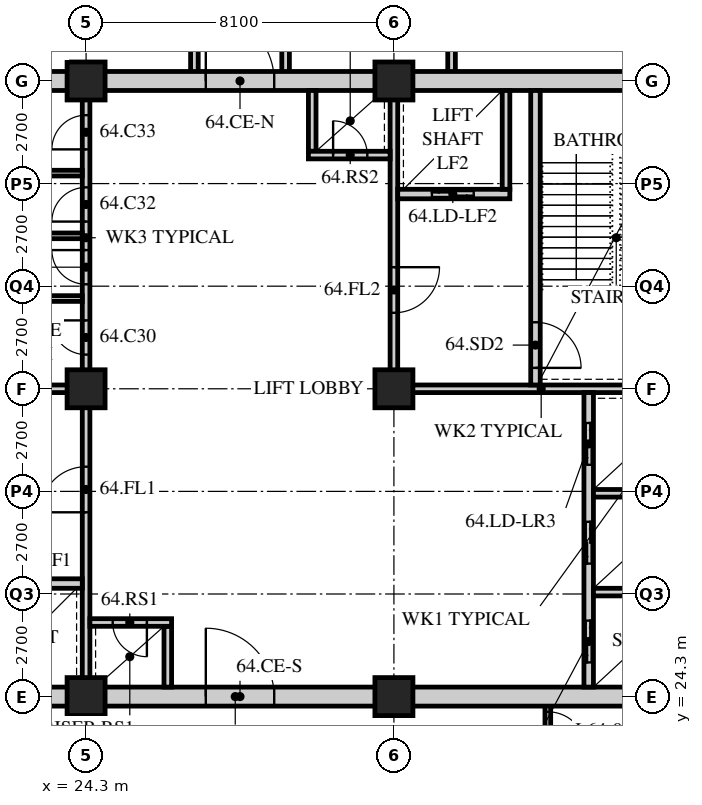
"""IFC4 building model, lengths in metres.
Left out: names, types, materials, properties, quantities, classifications, styles, units other than length and angle.
Written with IfcOpenShell. Run it as: python <this file> out.ifc"""

import sys

from ifc_helpers import new_model, si_unit, direction, frame, frame_2d, origin, origin_2d, place, context, subcontext, project, spatial, rectangle, hollow_rectangle, extrude, element, fill, save


model = new_model("IFC4")
c1 = context("Model", 3, precision=1e-05, world=origin(), true_north=direction((0.0, 1.0)))
c2 = subcontext(c1, "Body", "Model", "MODEL_VIEW")
j1 = project(units=[si_unit("LENGTHUNIT", "METRE"), si_unit("PLANEANGLEUNIT", "RADIAN")], contexts=[c1])
p1 = place(None, origin())
s1 = spatial("IfcSite", under=j1, at=p1, CompositionType="ELEMENT")
p2 = place(p1, origin())
s2 = spatial("IfcBuilding", under=s1, at=p2, CompositionType="ELEMENT")
p3 = place(p2, frame((0.0, 0.0, 250.2)))
s3 = spatial("IfcBuildingStorey", under=s2, at=p3, CompositionType="ELEMENT", Elevation=250.2)
for number, where, z_axis, x_axis in (
    (1, (24.3, 24.3, 0.0), (0.0, 0.0, 1.0), (1.0, 0.0, 0.0)),
    (2, (24.3, 32.4, 0.0), (0.0, 0.0, 1.0), (1.0, 0.0, 0.0)),
    (3, (24.3, 40.5, 0.0), (0.0, 0.0, 1.0), (1.0, 0.0, 0.0)),
    (4, (32.4, 24.3, 0.0), (0.0, 0.0, 1.0), (1.0, 0.0, 0.0)),
    (5, (32.4, 32.4, 0.0), (0.0, 0.0, 1.0), (1.0, 0.0, 0.0)),
    (6, (32.4, 40.5, 0.0), (0.0, 0.0, 1.0), (1.0, 0.0, 0.0)),
):
    element("IfcColumn", number, at=place(p3, frame(where, z_axis=z_axis, x_axis=x_axis)), inside=s3, PredefinedType="COLUMN", context=c2, shape_type="SweptSolid", body=[
        extrude(hollow_rectangle(XDim=1.0, YDim=1.0, WallThickness=0.1, at=origin_2d()), origin(), (0.0, 0.0, 1.0), 3.9),
    ])
for number, where, z_axis, x_axis in (
    (7, (33.917, 50.85, 0.0), (0.0, 0.0, 1.0), (0.0, -1.0, 0.0)),
    (8, (27.15, 40.5, 0.0), (0.0, 0.0, 1.0), (0.0, 1.0, 0.0)),
    (9, (29.55, 40.5, 0.0), (0.0, 0.0, 1.0), (0.0, 1.0, 0.0)),
):
    element("IfcWall", number, at=place(p3, frame(where, z_axis=z_axis, x_axis=x_axis)), inside=s3, PredefinedType="SOLIDWALL", context=c2, shape_type="SweptSolid", body=[
        extrude(rectangle(XDim=10.35, YDim=0.2, at=frame_2d((5.175, 0.0))), origin(), (0.0, 0.0, 1.0), 3.69),
    ])
p4 = place(p3, frame((36.45, 22.5, 0.0), z_axis=(0.0, 0.0, 1.0), x_axis=(0.0, 1.0, 0.0)))
e10 = element("IfcWall", 10, at=p4, inside=s3, PredefinedType="PARTITIONING", context=c2, shape_type="SweptSolid", body=[
    extrude(rectangle(XDim=1.8, YDim=0.15, at=frame_2d((0.9, 0.0))), origin(), (0.0, 0.0, 1.0), 3.69),
])
p5 = place(p4, frame((0.4, 0.0, 0.0)))
e11 = element("IfcOpeningElement", 11, at=p5, cuts=e10, PredefinedType="OPENING", context=c2, shape_type="SweptSolid", body=[
    extrude(rectangle(XDim=1.0, YDim=2.1, at=frame_2d((0.5, 1.05))), frame((0.0, 0.085, 0.0), z_axis=(0.0, -1.0, 0.0), x_axis=(1.0, 0.0, 0.0)), (0.0, 0.0, 1.0), 0.17),
])
p6 = place(p3, frame((15.95, 24.3, 0.0), z_axis=(0.0, 0.0, 1.0), x_axis=(1.0, 0.0, 0.0)))
e12 = element("IfcWall", 12, at=p6, inside=s3, PredefinedType="SOLIDWALL", context=c2, shape_type="SweptSolid", body=[
    extrude(rectangle(XDim=24.55, YDim=0.5, at=frame_2d((12.275, 0.0))), origin(), (0.0, 0.0, 1.0), 3.04),
])
p7 = place(p6, frame((11.5, 0.0, 0.0)))
e13 = element("IfcOpeningElement", 13, at=p7, cuts=e12, PredefinedType="OPENING", context=c2, shape_type="SweptSolid", body=[
    extrude(rectangle(XDim=1.8, YDim=2.4, at=frame_2d((0.9, 1.2))), frame((0.0, 0.26, 0.0), z_axis=(0.0, -1.0, 0.0), x_axis=(1.0, 0.0, 0.0)), (0.0, 0.0, 1.0), 0.52),
])
p8 = place(p3, frame((15.95, 40.5, 0.0), z_axis=(0.0, 0.0, 1.0), x_axis=(1.0, 0.0, 0.0)))
e14 = element("IfcWall", 14, at=p8, inside=s3, PredefinedType="SOLIDWALL", context=c2, shape_type="SweptSolid", body=[
    extrude(rectangle(XDim=24.55, YDim=0.5, at=frame_2d((12.275, 0.0))), origin(), (0.0, 0.0, 1.0), 3.04),
])
p9 = place(p8, frame((11.5, 0.0, 0.0)))
e15 = element("IfcOpeningElement", 15, at=p9, cuts=e14, PredefinedType="OPENING", context=c2, shape_type="SweptSolid", body=[
    extrude(rectangle(XDim=1.8, YDim=2.4, at=frame_2d((0.9, 1.2))), frame((0.0, 0.26, 0.0), z_axis=(0.0, -1.0, 0.0), x_axis=(1.0, 0.0, 0.0)), (0.0, 0.0, 1.0), 0.52),
])
p10 = place(p3, frame((16.45, 32.4, 0.0), z_axis=(0.0, 0.0, 1.0), x_axis=(1.0, 0.0, 0.0)))
e16 = element("IfcWall", 16, at=p10, inside=s3, PredefinedType="SOLIDWALL", context=c2, shape_type="SweptSolid", body=[
    extrude(rectangle(XDim=7.95, YDim=0.2, at=frame_2d((3.975, 0.0))), origin(), (0.0, 0.0, 1.0), 3.078),
])
p11 = place(p3, frame((24.3, 24.55, 0.0), z_axis=(0.0, 0.0, 1.0), x_axis=(0.0, 1.0, 0.0)))
e17 = element("IfcWall", 17, at=p11, inside=s3, PredefinedType="SOLIDWALL", context=c2, shape_type="SweptSolid", body=[
    extrude(rectangle(XDim=7.75, YDim=0.2, at=frame_2d((3.875, 0.0))), origin(), (0.0, 0.0, 1.0), 3.078),
])
p12 = place(p11, frame((4.6, 0.0, 0.0)))
e18 = element("IfcOpeningElement", 18, at=p12, cuts=e17, PredefinedType="OPENING", context=c2, shape_type="SweptSolid", body=[
    extrude(rectangle(XDim=1.2, YDim=2.1, at=frame_2d((0.6, 1.05))), frame((0.0, 0.11, 0.0), z_axis=(0.0, -1.0, 0.0), x_axis=(1.0, 0.0, 0.0)), (0.0, 0.0, 1.0), 0.22),
])
p13 = place(p3, frame((21.25, 27.275, 0.0), z_axis=(0.0, 0.0, 1.0), x_axis=(1.0, 0.0, 0.0)))
e19 = element("IfcWall", 19, at=p13, inside=s3, PredefinedType="SOLIDWALL", context=c2, shape_type="SweptSolid", body=[
    extrude(rectangle(XDim=2.95, YDim=0.25, at=frame_2d((1.475, 0.0))), origin(), (0.0, 0.0, 1.0), 3.69),
])
p14 = place(p13, frame((0.95, 0.0, 0.0)))
e20 = element("IfcOpeningElement", 20, at=p14, cuts=e19, PredefinedType="OPENING", context=c2, shape_type="SweptSolid", body=[
    extrude(rectangle(XDim=1.1, YDim=2.4, at=frame_2d((0.55, 1.2))), frame((0.0, 0.135, 0.0), z_axis=(0.0, -1.0, 0.0), x_axis=(1.0, 0.0, 0.0)), (0.0, 0.0, 1.0), 0.27),
])
p15 = place(p3, frame((26.45, 24.55, 0.0), z_axis=(0.0, 0.0, 1.0), x_axis=(0.0, 1.0, 0.0)))
e21 = element("IfcWall", 21, at=p15, inside=s3, PredefinedType="SOLIDWALL", context=c2, shape_type="SweptSolid", body=[
    extrude(rectangle(XDim=1.6, YDim=0.2, at=frame_2d((0.8, 0.0))), origin(), (0.0, 0.0, 1.0), 3.69),
])
p16 = place(p3, frame((24.4, 26.25, 0.0), z_axis=(0.0, 0.0, 1.0), x_axis=(1.0, 0.0, 0.0)))
e22 = element("IfcWall", 22, at=p16, inside=s3, PredefinedType="SOLIDWALL", context=c2, shape_type="SweptSolid", body=[
    extrude(rectangle(XDim=2.15, YDim=0.2, at=frame_2d((1.075, 0.0))), origin(), (0.0, 0.0, 1.0), 3.69),
])
p17 = place(p16, frame((0.6, 0.0, 0.0)))
e23 = element("IfcOpeningElement", 23, at=p17, cuts=e22, PredefinedType="OPENING", context=c2, shape_type="SweptSolid", body=[
    extrude(rectangle(XDim=0.9, YDim=2.1, at=frame_2d((0.45, 1.05))), frame((0.0, 0.11, 0.0), z_axis=(0.0, -1.0, 0.0), x_axis=(1.0, 0.0, 0.0)), (0.0, 0.0, 1.0), 0.22),
])
p18 = place(p3, frame((32.3, 32.4, 0.0), z_axis=(0.0, 0.0, 1.0), x_axis=(1.0, 0.0, 0.0)))
e24 = element("IfcWall", 24, at=p18, inside=s3, PredefinedType="SOLIDWALL", context=c2, shape_type="SweptSolid", body=[
    extrude(rectangle(XDim=7.95, YDim=0.2, at=frame_2d((3.975, 0.0))), origin(), (0.0, 0.0, 1.0), 3.078),
])
p19 = place(p3, frame((32.4, 32.5, 0.0), z_axis=(0.0, 0.0, 1.0), x_axis=(0.0, 1.0, 0.0)))
e25 = element("IfcWall", 25, at=p19, inside=s3, PredefinedType="SOLIDWALL", context=c2, shape_type="SweptSolid", body=[
    extrude(rectangle(XDim=7.75, YDim=0.2, at=frame_2d((3.875, 0.0))), origin(), (0.0, 0.0, 1.0), 3.078),
])
p20 = place(p19, frame((1.9, 0.0, 0.0)))
e26 = element("IfcOpeningElement", 26, at=p20, cuts=e25, PredefinedType="OPENING", context=c2, shape_type="SweptSolid", body=[
    extrude(rectangle(XDim=1.2, YDim=2.1, at=frame_2d((0.6, 1.05))), frame((0.0, 0.11, 0.0), z_axis=(0.0, -1.0, 0.0), x_axis=(1.0, 0.0, 0.0)), (0.0, 0.0, 1.0), 0.22),
])
p21 = place(p3, frame((37.525, 24.55, 0.0), z_axis=(0.0, 0.0, 1.0), x_axis=(0.0, 1.0, 0.0)))
e27 = element("IfcWall", 27, at=p21, inside=s3, PredefinedType="SOLIDWALL", context=c2, shape_type="SweptSolid", body=[
    extrude(rectangle(XDim=7.75, YDim=0.25, at=frame_2d((3.875, 0.0))), origin(), (0.0, 0.0, 1.0), 3.69),
])
p22 = place(p21, frame((0.65, 0.0, 0.0)))
e28 = element("IfcOpeningElement", 28, at=p22, cuts=e27, PredefinedType="OPENING", context=c2, shape_type="SweptSolid", body=[
    extrude(rectangle(XDim=1.1, YDim=2.4, at=frame_2d((0.55, 1.2))), frame((0.0, 0.135, 0.0), z_axis=(0.0, -1.0, 0.0), x_axis=(1.0, 0.0, 0.0)), (0.0, 0.0, 1.0), 0.27),
])
p23 = place(p21, frame((3.25, 0.0, 0.0)))
e29 = element("IfcOpeningElement", 29, at=p23, cuts=e27, PredefinedType="OPENING", context=c2, shape_type="SweptSolid", body=[
    extrude(rectangle(XDim=1.1, YDim=2.4, at=frame_2d((0.55, 1.2))), frame((0.0, 0.135, 0.0), z_axis=(0.0, -1.0, 0.0), x_axis=(1.0, 0.0, 0.0)), (0.0, 0.0, 1.0), 0.27),
])
p24 = place(p21, frame((5.85, 0.0, 0.0)))
e30 = element("IfcOpeningElement", 30, at=p24, cuts=e27, PredefinedType="OPENING", context=c2, shape_type="SweptSolid", body=[
    extrude(rectangle(XDim=1.1, YDim=2.4, at=frame_2d((0.55, 1.2))), frame((0.0, 0.135, 0.0), z_axis=(0.0, -1.0, 0.0), x_axis=(1.0, 0.0, 0.0)), (0.0, 0.0, 1.0), 0.27),
])
for number, where, z_axis, x_axis in (
    (31, (37.65, 27.05, 0.0), (0.0, 0.0, 1.0), (1.0, 0.0, 0.0)),
    (32, (37.65, 29.65, 0.0), (0.0, 0.0, 1.0), (1.0, 0.0, 0.0)),
):
    element("IfcWall", number, at=place(p3, frame(where, z_axis=z_axis, x_axis=x_axis)), inside=s3, PredefinedType="SOLIDWALL", context=c2, shape_type="SweptSolid", body=[
        extrude(rectangle(XDim=2.6, YDim=0.2, at=frame_2d((1.3, 0.0))), origin(), (0.0, 0.0, 1.0), 3.69),
    ])
p25 = place(p3, frame((36.125, 32.5, 0.0), z_axis=(0.0, 0.0, 1.0), x_axis=(0.0, 1.0, 0.0)))
e33 = element("IfcWall", 33, at=p25, inside=s3, PredefinedType="SOLIDWALL", context=c2, shape_type="SweptSolid", body=[
    extrude(rectangle(XDim=7.75, YDim=0.25, at=frame_2d((3.875, 0.0))), origin(), (0.0, 0.0, 1.0), 3.69),
])
p26 = place(p25, frame((0.45, 0.0, 0.0)))
e34 = element("IfcOpeningElement", 34, at=p26, cuts=e33, PredefinedType="OPENING", context=c2, shape_type="SweptSolid", body=[
    extrude(rectangle(XDim=1.2, YDim=2.1, at=frame_2d((0.6, 1.05))), frame((0.0, 0.135, 0.0), z_axis=(0.0, -1.0, 0.0), x_axis=(1.0, 0.0, 0.0)), (0.0, 0.0, 1.0), 0.27),
])
p27 = place(p3, frame((32.5, 37.525, 0.0), z_axis=(0.0, 0.0, 1.0), x_axis=(1.0, 0.0, 0.0)))
e35 = element("IfcWall", 35, at=p27, inside=s3, PredefinedType="SOLIDWALL", context=c2, shape_type="SweptSolid", body=[
    extrude(rectangle(XDim=2.95, YDim=0.25, at=frame_2d((1.475, 0.0))), origin(), (0.0, 0.0, 1.0), 3.69),
])
p28 = place(p27, frame((0.9, 0.0, 0.0)))
e36 = element("IfcOpeningElement", 36, at=p28, cuts=e35, PredefinedType="OPENING", context=c2, shape_type="SweptSolid", body=[
    extrude(rectangle(XDim=1.1, YDim=2.4, at=frame_2d((0.55, 1.2))), frame((0.0, 0.135, 0.0), z_axis=(0.0, -1.0, 0.0), x_axis=(1.0, 0.0, 0.0)), (0.0, 0.0, 1.0), 0.27),
])
p29 = place(p3, frame((35.35, 37.65, 0.0), z_axis=(0.0, 0.0, 1.0), x_axis=(0.0, 1.0, 0.0)))
e37 = element("IfcWall", 37, at=p29, inside=s3, PredefinedType="SOLIDWALL", context=c2, shape_type="SweptSolid", body=[
    extrude(rectangle(XDim=2.6, YDim=0.2, at=frame_2d((1.3, 0.0))), origin(), (0.0, 0.0, 1.0), 3.69),
])
p30 = place(p3, frame((30.25, 38.65, 0.0), z_axis=(0.0, 0.0, 1.0), x_axis=(0.0, 1.0, 0.0)))
e38 = element("IfcWall", 38, at=p30, inside=s3, PredefinedType="SOLIDWALL", context=c2, shape_type="SweptSolid", body=[
    extrude(rectangle(XDim=1.6, YDim=0.2, at=frame_2d((0.8, 0.0))), origin(), (0.0, 0.0, 1.0), 3.69),
])
p31 = place(p3, frame((30.15, 38.55, 0.0), z_axis=(0.0, 0.0, 1.0), x_axis=(1.0, 0.0, 0.0)))
e39 = element("IfcWall", 39, at=p31, inside=s3, PredefinedType="SOLIDWALL", context=c2, shape_type="SweptSolid", body=[
    extrude(rectangle(XDim=2.15, YDim=0.2, at=frame_2d((1.075, 0.0))), origin(), (0.0, 0.0, 1.0), 3.69),
])
p32 = place(p31, frame((0.65, 0.0, 0.0)))
e40 = element("IfcOpeningElement", 40, at=p32, cuts=e39, PredefinedType="OPENING", context=c2, shape_type="SweptSolid", body=[
    extrude(rectangle(XDim=0.9, YDim=2.1, at=frame_2d((0.45, 1.05))), frame((0.0, 0.11, 0.0), z_axis=(0.0, -1.0, 0.0), x_axis=(1.0, 0.0, 0.0)), (0.0, 0.0, 1.0), 0.22),
])
p33 = place(p3, frame((24.3, 32.5, 0.0), z_axis=(0.0, 0.0, 1.0), x_axis=(0.0, 1.0, 0.0)))
e41 = element("IfcWall", 41, at=p33, inside=s3, PredefinedType="PARTITIONING", context=c2, shape_type="SweptSolid", body=[
    extrude(rectangle(XDim=7.75, YDim=0.2, at=frame_2d((3.875, 0.0))), origin(), (0.0, 0.0, 1.0), 3.078),
])
p34 = place(p33, frame((0.8, 0.0, 0.0)))
e42 = element("IfcOpeningElement", 42, at=p34, cuts=e41, PredefinedType="OPENING", context=c2, shape_type="SweptSolid", body=[
    extrude(rectangle(XDim=0.9, YDim=2.1, at=frame_2d((0.45, 1.05))), frame((0.0, 0.11, 0.0), z_axis=(0.0, -1.0, 0.0), x_axis=(1.0, 0.0, 0.0)), (0.0, 0.0, 1.0), 0.22),
])
p35 = place(p33, frame((2.65, 0.0, 0.0)))
e43 = element("IfcOpeningElement", 43, at=p35, cuts=e41, PredefinedType="OPENING", context=c2, shape_type="SweptSolid", body=[
    extrude(rectangle(XDim=0.9, YDim=2.1, at=frame_2d((0.45, 1.05))), frame((0.0, 0.11, 0.0), z_axis=(0.0, -1.0, 0.0), x_axis=(1.0, 0.0, 0.0)), (0.0, 0.0, 1.0), 0.22),
])
p36 = place(p33, frame((4.3, 0.0, 0.0)))
e44 = element("IfcOpeningElement", 44, at=p36, cuts=e41, PredefinedType="OPENING", context=c2, shape_type="SweptSolid", body=[
    extrude(rectangle(XDim=0.9, YDim=2.1, at=frame_2d((0.45, 1.05))), frame((0.0, 0.11, 0.0), z_axis=(0.0, -1.0, 0.0), x_axis=(1.0, 0.0, 0.0)), (0.0, 0.0, 1.0), 0.22),
])
p37 = place(p33, frame((6.2, 0.0, 0.0)))
e45 = element("IfcOpeningElement", 45, at=p37, cuts=e41, PredefinedType="OPENING", context=c2, shape_type="SweptSolid", body=[
    extrude(rectangle(XDim=0.9, YDim=2.1, at=frame_2d((0.45, 1.05))), frame((0.0, 0.11, 0.0), z_axis=(0.0, -1.0, 0.0), x_axis=(1.0, 0.0, 0.0)), (0.0, 0.0, 1.0), 0.22),
])
for number, where, z_axis, x_axis in (
    (46, (21.05, 34.775, 0.0), (0.0, 0.0, 1.0), (1.0, 0.0, 0.0)),
    (47, (21.05, 36.425, 0.0), (0.0, 0.0, 1.0), (1.0, 0.0, 0.0)),
):
    element("IfcWall", number, at=place(p3, frame(where, z_axis=z_axis, x_axis=x_axis)), inside=s3, PredefinedType="PARTITIONING", context=c2, shape_type="SweptSolid", body=[
        extrude(rectangle(XDim=3.15, YDim=0.15, at=frame_2d((1.575, 0.0))), origin(), (0.0, 0.0, 1.0), 3.69),
    ])
p38 = place(p3, frame((21.2, 38.075, 0.0), z_axis=(0.0, 0.0, 1.0), x_axis=(1.0, 0.0, 0.0)))
e48 = element("IfcWall", 48, at=p38, inside=s3, PredefinedType="PARTITIONING", context=c2, shape_type="SweptSolid", body=[
    extrude(rectangle(XDim=3.0, YDim=0.15, at=frame_2d((1.5, 0.0))), origin(), (0.0, 0.0, 1.0), 3.69),
])
p39 = place(p5, origin())
e49 = element("IfcDoor", 49, at=p39, inside=s3, OperationType="SINGLE_SWING_RIGHT", PredefinedType="DOOR", context=c2, shape_type="SweptSolid", body=[
    extrude(rectangle(XDim=1.0, YDim=2.1, at=frame_2d((0.5, 1.05))), frame((0.0, 0.025, 0.0), z_axis=(0.0, -1.0, 0.0), x_axis=(1.0, 0.0, 0.0)), (0.0, 0.0, 1.0), 0.05),
])
fill(e11, e49)
p40 = place(p34, origin())
e50 = element("IfcDoor", 50, at=p40, inside=s3, OperationType="SINGLE_SWING_RIGHT", PredefinedType="DOOR", context=c2, shape_type="SweptSolid", body=[
    extrude(rectangle(XDim=0.9, YDim=2.1, at=frame_2d((0.45, 1.05))), frame((0.0, 0.025, 0.0), z_axis=(0.0, -1.0, 0.0), x_axis=(1.0, 0.0, 0.0)), (0.0, 0.0, 1.0), 0.05),
])
fill(e42, e50)
p41 = place(p35, origin())
e51 = element("IfcDoor", 51, at=p41, inside=s3, OperationType="SINGLE_SWING_RIGHT", PredefinedType="DOOR", context=c2, shape_type="SweptSolid", body=[
    extrude(rectangle(XDim=0.9, YDim=2.1, at=frame_2d((0.45, 1.05))), frame((0.0, 0.025, 0.0), z_axis=(0.0, -1.0, 0.0), x_axis=(1.0, 0.0, 0.0)), (0.0, 0.0, 1.0), 0.05),
])
fill(e43, e51)
p42 = place(p36, origin())
e52 = element("IfcDoor", 52, at=p42, inside=s3, OperationType="SINGLE_SWING_LEFT", PredefinedType="DOOR", context=c2, shape_type="SweptSolid", body=[
    extrude(rectangle(XDim=0.9, YDim=2.1, at=frame_2d((0.45, 1.05))), frame((0.0, 0.025, 0.0), z_axis=(0.0, -1.0, 0.0), x_axis=(1.0, 0.0, 0.0)), (0.0, 0.0, 1.0), 0.05),
])
fill(e44, e52)
p43 = place(p37, origin())
e53 = element("IfcDoor", 53, at=p43, inside=s3, OperationType="SINGLE_SWING_LEFT", PredefinedType="DOOR", context=c2, shape_type="SweptSolid", body=[
    extrude(rectangle(XDim=0.9, YDim=2.1, at=frame_2d((0.45, 1.05))), frame((0.0, 0.025, 0.0), z_axis=(0.0, -1.0, 0.0), x_axis=(1.0, 0.0, 0.0)), (0.0, 0.0, 1.0), 0.05),
])
fill(e45, e53)
p44 = place(p12, origin())
e54 = element("IfcDoor", 54, at=p44, inside=s3, OperationType="SINGLE_SWING_LEFT", PredefinedType="DOOR", context=c2, shape_type="SweptSolid", body=[
    extrude(rectangle(XDim=1.2, YDim=2.1, at=frame_2d((0.6, 1.05))), frame((0.0, 0.025, 0.0), z_axis=(0.0, -1.0, 0.0), x_axis=(1.0, 0.0, 0.0)), (0.0, 0.0, 1.0), 0.05),
])
fill(e18, e54)
p45 = place(p17, origin())
e55 = element("IfcDoor", 55, at=p45, inside=s3, OperationType="SINGLE_SWING_LEFT", PredefinedType="DOOR", context=c2, shape_type="SweptSolid", body=[
    extrude(rectangle(XDim=0.9, YDim=2.1, at=frame_2d((0.45, 1.05))), frame((0.0, 0.025, 0.0), z_axis=(0.0, -1.0, 0.0), x_axis=(1.0, 0.0, 0.0)), (0.0, 0.0, 1.0), 0.05),
])
fill(e23, e55)
p46 = place(p26, origin())
e56 = element("IfcDoor", 56, at=p46, inside=s3, OperationType="SINGLE_SWING_RIGHT", PredefinedType="DOOR", context=c2, shape_type="SweptSolid", body=[
    extrude(rectangle(XDim=1.2, YDim=2.1, at=frame_2d((0.6, 1.05))), frame((0.0, 0.025, 0.0), z_axis=(0.0, -1.0, 0.0), x_axis=(1.0, 0.0, 0.0)), (0.0, 0.0, 1.0), 0.05),
])
fill(e34, e56)
p47 = place(p20, origin())
e57 = element("IfcDoor", 57, at=p47, inside=s3, OperationType="SINGLE_SWING_LEFT", PredefinedType="DOOR", context=c2, shape_type="SweptSolid", body=[
    extrude(rectangle(XDim=1.2, YDim=2.1, at=frame_2d((0.6, 1.05))), frame((0.0, 0.025, 0.0), z_axis=(0.0, -1.0, 0.0), x_axis=(1.0, 0.0, 0.0)), (0.0, 0.0, 1.0), 0.05),
])
fill(e26, e57)
p48 = place(p32, origin())
e58 = element("IfcDoor", 58, at=p48, inside=s3, OperationType="SINGLE_SWING_LEFT", PredefinedType="DOOR", context=c2, shape_type="SweptSolid", body=[
    extrude(rectangle(XDim=0.9, YDim=2.1, at=frame_2d((0.45, 1.05))), frame((0.0, 0.025, 0.0), z_axis=(0.0, -1.0, 0.0), x_axis=(1.0, 0.0, 0.0)), (0.0, 0.0, 1.0), 0.05),
])
fill(e40, e58)
p49 = place(p22, origin())
e59 = element("IfcDoor", 59, at=p49, inside=s3, OperationType="DOUBLE_DOOR_SLIDING", PredefinedType="DOOR", context=c2, shape_type="SweptSolid", body=[
    extrude(rectangle(XDim=1.1, YDim=2.4, at=frame_2d((0.55, 1.2))), frame((0.0, 0.025, 0.0), z_axis=(0.0, -1.0, 0.0), x_axis=(1.0, 0.0, 0.0)), (0.0, 0.0, 1.0), 0.05),
])
fill(e28, e59)
p50 = place(p23, origin())
e60 = element("IfcDoor", 60, at=p50, inside=s3, OperationType="DOUBLE_DOOR_SLIDING", PredefinedType="DOOR", context=c2, shape_type="SweptSolid", body=[
    extrude(rectangle(XDim=1.1, YDim=2.4, at=frame_2d((0.55, 1.2))), frame((0.0, 0.025, 0.0), z_axis=(0.0, -1.0, 0.0), x_axis=(1.0, 0.0, 0.0)), (0.0, 0.0, 1.0), 0.05),
])
fill(e29, e60)
p51 = place(p24, origin())
e61 = element("IfcDoor", 61, at=p51, inside=s3, OperationType="DOUBLE_DOOR_SLIDING", PredefinedType="DOOR", context=c2, shape_type="SweptSolid", body=[
    extrude(rectangle(XDim=1.1, YDim=2.4, at=frame_2d((0.55, 1.2))), frame((0.0, 0.025, 0.0), z_axis=(0.0, -1.0, 0.0), x_axis=(1.0, 0.0, 0.0)), (0.0, 0.0, 1.0), 0.05),
])
fill(e30, e61)
p52 = place(p28, origin())
e62 = element("IfcDoor", 62, at=p52, inside=s3, OperationType="DOUBLE_DOOR_SLIDING", PredefinedType="DOOR", context=c2, shape_type="SweptSolid", body=[
    extrude(rectangle(XDim=1.1, YDim=2.4, at=frame_2d((0.55, 1.2))), frame((0.0, 0.025, 0.0), z_axis=(0.0, -1.0, 0.0), x_axis=(1.0, 0.0, 0.0)), (0.0, 0.0, 1.0), 0.05),
])
fill(e36, e62)
p53 = place(p7, origin())
e63 = element("IfcDoor", 63, at=p53, inside=s3, OperationType="DOUBLE_DOOR_SINGLE_SWING", PredefinedType="DOOR", context=c2, shape_type="SweptSolid", body=[
    extrude(rectangle(XDim=1.8, YDim=2.4, at=frame_2d((0.9, 1.2))), frame((0.0, 0.025, 0.0), z_axis=(0.0, -1.0, 0.0), x_axis=(1.0, 0.0, 0.0)), (0.0, 0.0, 1.0), 0.05),
])
fill(e13, e63)
p54 = place(p9, origin())
e64 = element("IfcDoor", 64, at=p54, inside=s3, OperationType="DOUBLE_DOOR_SINGLE_SWING", PredefinedType="DOOR", context=c2, shape_type="SweptSolid", body=[
    extrude(rectangle(XDim=1.8, YDim=2.4, at=frame_2d((0.9, 1.2))), frame((0.0, 0.025, 0.0), z_axis=(0.0, -1.0, 0.0), x_axis=(1.0, 0.0, 0.0)), (0.0, 0.0, 1.0), 0.05),
])
fill(e15, e64)
save(model, sys.argv[1])
